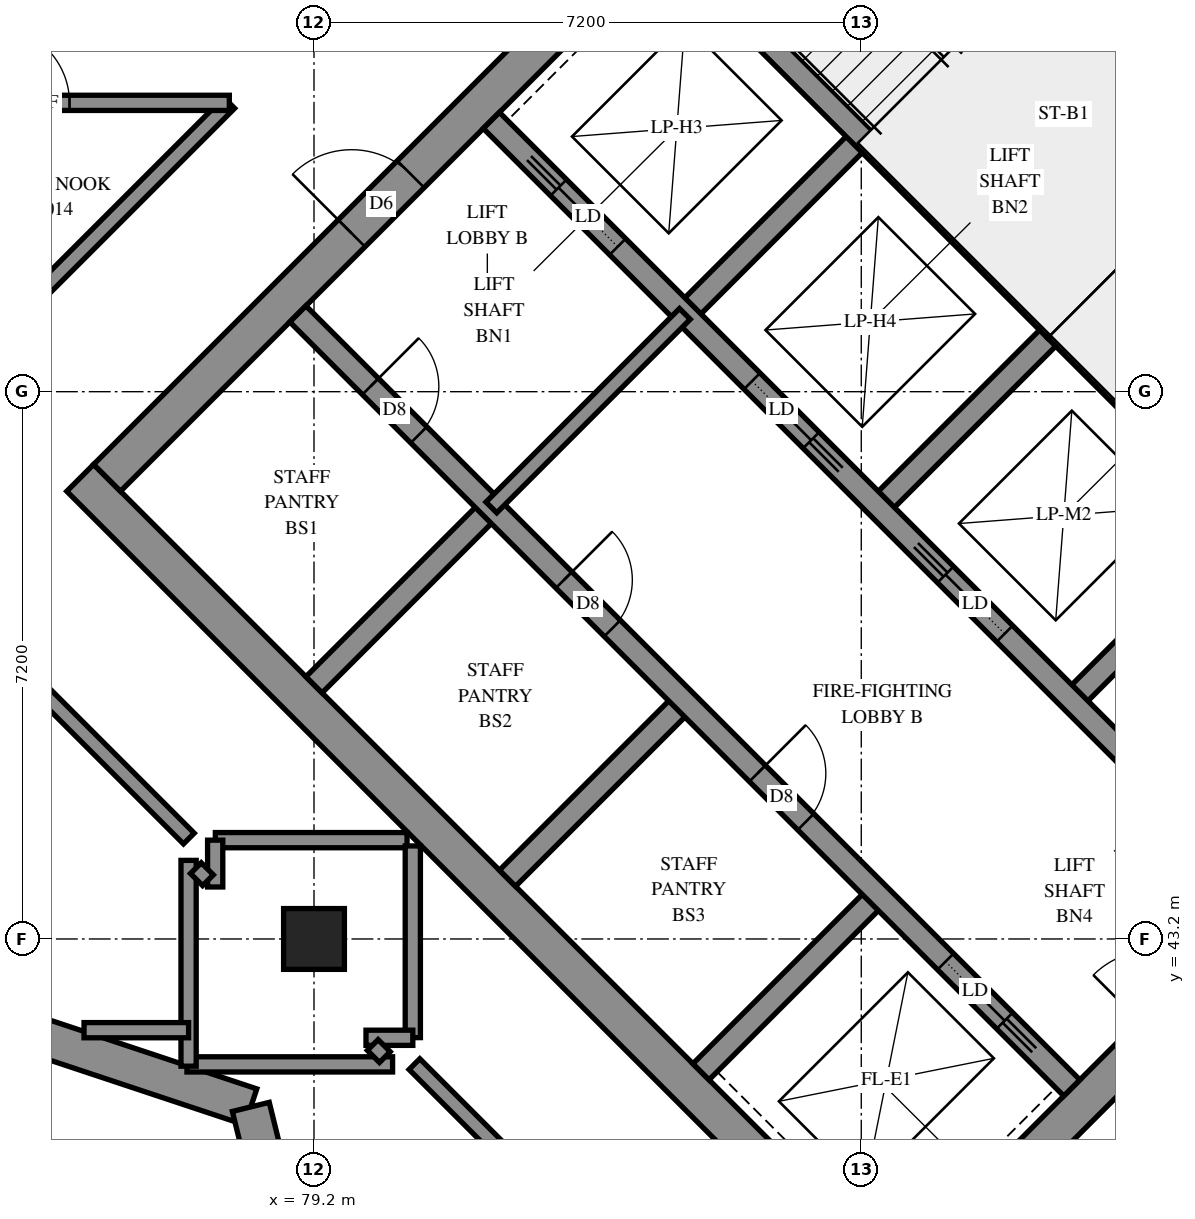
"""IFC4 building model, lengths in metres.
Left out: names, types, materials, properties, quantities, classifications, styles, units other than length and angle.
Written with IfcOpenShell. Run it as: python <this file> out.ifc"""

import sys

from ifc_helpers import new_model, si_unit, direction, frame, frame_2d, origin, origin_2d, place, context, subcontext, project, spatial, polyline, rectangle, outline, extrude, element, fill, save


model = new_model("IFC4")
c1 = context("Model", 3, precision=1e-05, world=origin(), true_north=direction((0.0, 1.0)))
c2 = subcontext(c1, "Body", "Model", "MODEL_VIEW")
j1 = project(units=[si_unit("LENGTHUNIT", "METRE"), si_unit("PLANEANGLEUNIT", "RADIAN")], contexts=[c1])
p1 = place(None, origin())
s1 = spatial("IfcSite", under=j1, at=p1, CompositionType="ELEMENT")
p2 = place(p1, origin())
s2 = spatial("IfcBuilding", under=s1, at=p2, CompositionType="ELEMENT")
p3 = place(p2, frame((0.0, 0.0, 223.6)))
s3 = spatial("IfcBuildingStorey", under=s2, at=p3, CompositionType="ELEMENT", Elevation=223.6)
p4 = place(p3, frame((79.2, 43.2, 0.0), z_axis=(0.0, 0.0, 1.0), x_axis=(1.0, 0.0, 0.0)))
e1 = element("IfcColumn", 1, at=p4, inside=s3, PredefinedType="COLUMN", context=c2, shape_type="SweptSolid", body=[
    extrude(rectangle(XDim=0.8, YDim=0.8, at=origin_2d()), origin(), (0.0, 0.0, 1.0), 3.1),
])
p5 = place(p3, frame((76.124, 49.267, -0.3), z_axis=(0.0, 0.0, 1.0), x_axis=(0.7071067812, -0.7071067812, 0.0)))
e2 = element("IfcWall", 2, at=p5, inside=s3, PredefinedType="SHEAR", context=c2, shape_type="SweptSolid", body=[
    extrude(rectangle(XDim=15.4, YDim=0.5, at=frame_2d((7.7, 0.0))), origin(), (0.0, 0.0, 1.0), 2.7),
])
p6 = place(p3, frame((86.66, 59.802, -0.3), z_axis=(0.0, 0.0, 1.0), x_axis=(0.7071067812, -0.7071067812, 0.0)))
e3 = element("IfcWall", 3, at=p6, inside=s3, PredefinedType="SHEAR", context=c2, shape_type="SweptSolid", body=[
    extrude(rectangle(XDim=15.4, YDim=0.5, at=frame_2d((7.7, 0.0))), origin(), (0.0, 0.0, 1.0), 2.7),
])
p7 = place(p6, frame((10.5, 0.0, 0.3)))
e4 = element("IfcOpeningElement", 4, at=p7, cuts=e3, PredefinedType="OPENING", context=c2, shape_type="SweptSolid", body=[
    extrude(rectangle(XDim=0.8, YDim=2.1, at=frame_2d((0.4, 1.05))), frame((0.0, 0.26, 0.0), z_axis=(0.0, -1.0, 0.0), x_axis=(1.0, 0.0, 0.0)), (0.0, 0.0, 1.0), 0.52),
])
p8 = place(p3, frame((76.478, 49.267, -0.3), z_axis=(0.0, 0.0, 1.0), x_axis=(0.7071067812, 0.7071067812, 0.0)))
e5 = element("IfcWall", 5, at=p8, inside=s3, PredefinedType="SHEAR", context=c2, shape_type="SweptSolid", body=[
    extrude(rectangle(XDim=14.4, YDim=0.5, at=frame_2d((7.2, 0.0))), origin(), (0.0, 0.0, 1.0), 2.7),
])
p9 = place(p8, frame((4.55, 0.0, 0.3)))
e6 = element("IfcOpeningElement", 6, at=p9, cuts=e5, PredefinedType="OPENING", context=c2, shape_type="SweptSolid", body=[
    extrude(rectangle(XDim=1.1, YDim=2.1, at=frame_2d((0.55, 1.05))), frame((0.0, 0.26, 0.0), z_axis=(0.0, -1.0, 0.0), x_axis=(1.0, 0.0, 0.0)), (0.0, 0.0, 1.0), 0.52),
])
p10 = place(p8, frame((11.35, 0.0, 0.3)))
e7 = element("IfcOpeningElement", 7, at=p10, cuts=e5, PredefinedType="OPENING", context=c2, shape_type="SweptSolid", body=[
    extrude(rectangle(XDim=1.1, YDim=2.1, at=frame_2d((0.55, 1.05))), frame((0.0, 0.26, 0.0), z_axis=(0.0, -1.0, 0.0), x_axis=(1.0, 0.0, 0.0)), (0.0, 0.0, 1.0), 0.52),
])
p11 = place(p3, frame((87.013, 38.731, -0.3), z_axis=(0.0, 0.0, 1.0), x_axis=(0.7071067812, 0.7071067812, 0.0)))
e8 = element("IfcWall", 8, at=p11, inside=s3, PredefinedType="SHEAR", context=c2, shape_type="SweptSolid", body=[
    extrude(rectangle(XDim=14.4, YDim=0.5, at=frame_2d((7.2, 0.0))), origin(), (0.0, 0.0, 1.0), 2.7),
])
p12 = place(p11, frame((4.55, 0.0, 0.3)))
e9 = element("IfcOpeningElement", 9, at=p12, cuts=e8, PredefinedType="OPENING", context=c2, shape_type="SweptSolid", body=[
    extrude(rectangle(XDim=1.1, YDim=2.1, at=frame_2d((0.55, 1.05))), frame((0.0, 0.26, 0.0), z_axis=(0.0, -1.0, 0.0), x_axis=(1.0, 0.0, 0.0)), (0.0, 0.0, 1.0), 0.52),
])
p13 = place(p11, frame((11.35, 0.0, 0.3)))
e10 = element("IfcOpeningElement", 10, at=p13, cuts=e8, PredefinedType="OPENING", context=c2, shape_type="SweptSolid", body=[
    extrude(rectangle(XDim=1.1, YDim=2.1, at=frame_2d((0.55, 1.05))), frame((0.0, 0.26, 0.0), z_axis=(0.0, -1.0, 0.0), x_axis=(1.0, 0.0, 0.0)), (0.0, 0.0, 1.0), 0.52),
])
for number, where, z_axis, x_axis in (
    (11, (79.2, 46.544, 0.0), (0.0, 0.0, 1.0), (0.707, 0.707, 0.0)),
    (12, (84.079, 51.423, 0.0), (0.0, 0.0, 1.0), (0.707, 0.707, 0.0)),
):
    element("IfcWall", number, at=place(p3, frame(where, z_axis=z_axis, x_axis=x_axis)), inside=s3, PredefinedType="SOLIDWALL", context=c2, shape_type="SweptSolid", body=[
        extrude(rectangle(XDim=3.3, YDim=0.3, at=frame_2d((1.65, 0.0))), origin(), (0.0, 0.0, 1.0), 3.1),
    ])
p14 = place(p3, frame((81.746, 43.999, 0.0), z_axis=(0.0, 0.0, 1.0), x_axis=(0.7071067812, 0.7071067812, 0.0)))
e13 = element("IfcWall", 13, at=p14, inside=s3, PredefinedType="SOLIDWALL", context=c2, shape_type="SweptSolid", body=[
    extrude(rectangle(XDim=3.3, YDim=0.3, at=frame_2d((1.65, 0.0))), origin(), (0.0, 0.0, 1.0), 3.1),
])
p15 = place(p3, frame((86.625, 48.878, 0.0), z_axis=(0.0, 0.0, 1.0), x_axis=(0.7071067812, 0.7071067812, 0.0)))
e14 = element("IfcWall", 14, at=p15, inside=s3, PredefinedType="SOLIDWALL", context=c2, shape_type="SweptSolid", body=[
    extrude(rectangle(XDim=3.3, YDim=0.3, at=frame_2d((1.65, 0.0))), origin(), (0.0, 0.0, 1.0), 3.1),
])
p16 = place(p3, frame((84.291, 41.453, 0.0), z_axis=(0.0, 0.0, 1.0), x_axis=(0.7071067812, 0.7071067812, 0.0)))
e15 = element("IfcWall", 15, at=p16, inside=s3, PredefinedType="SOLIDWALL", context=c2, shape_type="SweptSolid", body=[
    extrude(rectangle(XDim=3.3, YDim=0.3, at=frame_2d((1.65, 0.0))), origin(), (0.0, 0.0, 1.0), 3.1),
])
p17 = place(p3, frame((89.17, 46.332, 0.0), z_axis=(0.0, 0.0, 1.0), x_axis=(0.7071067812, 0.7071067812, 0.0)))
e16 = element("IfcWall", 16, at=p17, inside=s3, PredefinedType="SOLIDWALL", context=c2, shape_type="SweptSolid", body=[
    extrude(rectangle(XDim=3.3, YDim=0.3, at=frame_2d((1.65, 0.0))), origin(), (0.0, 0.0, 1.0), 3.1),
])
p18 = place(p3, frame((78.988, 51.423, 0.0), z_axis=(0.0, 0.0, 1.0), x_axis=(0.7071067812, -0.7071067812, 0.0)))
e17 = element("IfcWall", 17, at=p18, inside=s3, PredefinedType="SOLIDWALL", context=c2, shape_type="SweptSolid", body=[
    extrude(rectangle(XDim=14.4, YDim=0.3, at=frame_2d((7.2, 0.0))), origin(), (0.0, 0.0, 1.0), 3.1),
])
p19 = place(p18, frame((1.35, 0.0, 0.0)))
e18 = element("IfcOpeningElement", 18, at=p19, cuts=e17, PredefinedType="OPENING", context=c2, shape_type="SweptSolid", body=[
    extrude(rectangle(XDim=0.9, YDim=2.1, at=frame_2d((0.45, 1.05))), frame((0.0, 0.16, 0.0), z_axis=(0.0, -1.0, 0.0), x_axis=(1.0, 0.0, 0.0)), (0.0, 0.0, 1.0), 0.32),
])
p20 = place(p18, frame((4.95, 0.0, 0.0)))
e19 = element("IfcOpeningElement", 19, at=p20, cuts=e17, PredefinedType="OPENING", context=c2, shape_type="SweptSolid", body=[
    extrude(rectangle(XDim=0.9, YDim=2.1, at=frame_2d((0.45, 1.05))), frame((0.0, 0.16, 0.0), z_axis=(0.0, -1.0, 0.0), x_axis=(1.0, 0.0, 0.0)), (0.0, 0.0, 1.0), 0.32),
])
p21 = place(p18, frame((8.55, 0.0, 0.0)))
e20 = element("IfcOpeningElement", 20, at=p21, cuts=e17, PredefinedType="OPENING", context=c2, shape_type="SweptSolid", body=[
    extrude(rectangle(XDim=0.9, YDim=2.1, at=frame_2d((0.45, 1.05))), frame((0.0, 0.16, 0.0), z_axis=(0.0, -1.0, 0.0), x_axis=(1.0, 0.0, 0.0)), (0.0, 0.0, 1.0), 0.32),
])
p22 = place(p18, frame((12.05, 0.0, 0.0)))
e21 = element("IfcOpeningElement", 21, at=p22, cuts=e17, PredefinedType="OPENING", context=c2, shape_type="SweptSolid", body=[
    extrude(rectangle(XDim=1.1, YDim=2.1, at=frame_2d((0.55, 1.05))), frame((0.0, 0.16, 0.0), z_axis=(0.0, -1.0, 0.0), x_axis=(1.0, 0.0, 0.0)), (0.0, 0.0, 1.0), 0.32),
])
p23 = place(p3, frame((81.534, 53.969, 0.0), z_axis=(0.0, 0.0, 1.0), x_axis=(0.707103309, -0.7071102534, 0.0)))
e22 = element("IfcWall", 22, at=p23, inside=s3, PredefinedType="SOLIDWALL", context=c2, shape_type="SweptSolid", body=[
    extrude(rectangle(XDim=14.4, YDim=0.3, at=frame_2d((7.2, 0.0))), origin(), (0.0, 0.0, 1.0), 3.1),
])
p24 = place(p23, frame((1.25, 0.0, 0.0)))
e23 = element("IfcOpeningElement", 23, at=p24, cuts=e22, PredefinedType="OPENING", context=c2, shape_type="SweptSolid", body=[
    extrude(rectangle(XDim=1.1, YDim=2.1, at=frame_2d((0.55, 1.05))), frame((0.0, 0.16, 0.0), z_axis=(0.0, -1.0, 0.0), x_axis=(1.0, 0.0, 0.0)), (0.0, 0.0, 1.0), 0.32),
])
p25 = place(p23, frame((4.85, 0.0, 0.0)))
e24 = element("IfcOpeningElement", 24, at=p25, cuts=e22, PredefinedType="OPENING", context=c2, shape_type="SweptSolid", body=[
    extrude(rectangle(XDim=1.1, YDim=2.1, at=frame_2d((0.55, 1.05))), frame((0.0, 0.16, 0.0), z_axis=(0.0, -1.0, 0.0), x_axis=(1.0, 0.0, 0.0)), (0.0, 0.0, 1.0), 0.32),
])
p26 = place(p23, frame((8.45, 0.0, 0.0)))
e25 = element("IfcOpeningElement", 25, at=p26, cuts=e22, PredefinedType="OPENING", context=c2, shape_type="SweptSolid", body=[
    extrude(rectangle(XDim=1.1, YDim=2.1, at=frame_2d((0.55, 1.05))), frame((0.0, 0.16, 0.0), z_axis=(0.0, -1.0, 0.0), x_axis=(1.0, 0.0, 0.0)), (0.0, 0.0, 1.0), 0.32),
])
p27 = place(p23, frame((12.05, 0.0, 0.0)))
e26 = element("IfcOpeningElement", 26, at=p27, cuts=e22, PredefinedType="OPENING", context=c2, shape_type="SweptSolid", body=[
    extrude(rectangle(XDim=1.1, YDim=2.1, at=frame_2d((0.55, 1.05))), frame((0.0, 0.16, 0.0), z_axis=(0.0, -1.0, 0.0), x_axis=(1.0, 0.0, 0.0)), (0.0, 0.0, 1.0), 0.32),
])
for number, where, z_axis, x_axis in (
    (27, (83.867, 56.302, 0.0), (0.0, 0.0, 1.0), (0.707, -0.707, 0.0)),
    (28, (88.958, 51.211, 0.0), (0.0, 0.0, 1.0), (0.707, -0.707, 0.0)),
):
    element("IfcWall", number, at=place(p3, frame(where, z_axis=z_axis, x_axis=x_axis)), inside=s3, PredefinedType="SOLIDWALL", context=c2, shape_type="SweptSolid", body=[
        extrude(rectangle(XDim=7.2, YDim=0.3, at=frame_2d((3.6, 0.0))), origin(), (0.0, 0.0, 1.0), 3.1),
    ])
p28 = place(p3, frame((88.958, 51.211, 0.0), z_axis=(0.0, 0.0, 1.0), x_axis=(0.7071067812, 0.7071067812, 0.0)))
e29 = element("IfcWall", 29, at=p28, inside=s3, PredefinedType="SOLIDWALL", context=c2, shape_type="SweptSolid", body=[
    extrude(rectangle(XDim=4.2, YDim=0.3, at=frame_2d((2.1, 0.0))), origin(), (0.0, 0.0, 1.0), 3.1),
])
p29 = place(p3, frame((74.559, 42.257, 0.0), z_axis=(0.0, 0.0, 1.0), x_axis=(0.9489644032, -0.3153831979, 0.0)))
e30 = element("IfcWall", 30, at=p29, inside=s3, PredefinedType="SOLIDWALL", context=c2, shape_type="SweptSolid", body=[
    extrude(outline(polyline([(0.062, -0.25), (3.877, -0.25), (4.152, 0.25), (-0.062, 0.25), (0.062, -0.25)])), origin(), (0.0, 0.0, 1.0), 3.1),
])
p30 = place(p3, frame((78.369, 40.991, 0.0), z_axis=(0.0, 0.0, 1.0), x_axis=(0.2390889045, -0.9709976806, 0.0)))
e31 = element("IfcWall", 31, at=p30, inside=s3, PredefinedType="SOLIDWALL", context=c2, shape_type="SweptSolid", body=[
    extrude(outline(polyline([(0.138, -0.25), (4.775, -0.25), (4.486, 0.25), (-0.138, 0.25), (0.138, -0.25)])), origin(), (0.0, 0.0, 1.0), 3.1),
])
p31 = place(p30, frame((2.259, 0.0, 0.45)))
e32 = element("IfcOpeningElement", 32, at=p31, cuts=e31, PredefinedType="OPENING", context=c2, shape_type="SweptSolid", body=[
    extrude(rectangle(XDim=1.2, YDim=2.5, at=frame_2d((0.6, 1.25))), frame((0.0, 0.26, 0.0), z_axis=(0.0, -1.0, 0.0), x_axis=(1.0, 0.0, 0.0)), (0.0, 0.0, 1.0), 0.52),
])
p32 = place(p3, frame((81.534, 48.878, 0.0), z_axis=(0.0, 0.0, 1.0), x_axis=(0.707092892, 0.7071206701, 0.0)))
e33 = element("IfcWall", 33, at=p32, inside=s3, PredefinedType="PARTITIONING", context=c2, shape_type="SweptSolid", body=[
    extrude(rectangle(XDim=3.6, YDim=0.2, at=frame_2d((1.8, 0.0))), origin(), (0.0, 0.0, 1.0), 3.1),
])
p33 = place(p3, frame((86.835, 35.231, 0.0), z_axis=(0.0, 0.0, 1.0), x_axis=(0.7071067812, 0.7071067812, 0.0)))
e34 = element("IfcWall", 34, at=p33, inside=s3, PredefinedType="PARTITIONING", context=c2, shape_type="SweptSolid", body=[
    extrude(rectangle(XDim=7.6, YDim=0.2, at=frame_2d((3.8, 0.0))), origin(), (0.0, 0.0, 1.0), 3.1),
])
p34 = place(p33, frame((6.346, 0.0, 0.0)))
e35 = element("IfcOpeningElement", 35, at=p34, cuts=e34, PredefinedType="OPENING", context=c2, shape_type="SweptSolid", body=[
    extrude(rectangle(XDim=1.0, YDim=2.1, at=frame_2d((0.5, 1.05))), frame((0.0, 0.11, 0.0), z_axis=(0.0, -1.0, 0.0), x_axis=(1.0, 0.0, 0.0)), (0.0, 0.0, 1.0), 0.22),
])
p35 = place(p3, frame((80.522, 41.553, 0.0), z_axis=(0.0, 0.0, 1.0), x_axis=(0.7071067812, -0.7071067812, 0.0)))
e36 = element("IfcWall", 36, at=p35, inside=s3, PredefinedType="PARTITIONING", context=c2, shape_type="SweptSolid", body=[
    extrude(rectangle(XDim=6.836, YDim=0.2, at=frame_2d((3.418, 0.0))), origin(), (0.0, 0.0, 1.0), 3.1),
])
p36 = place(p3, frame((74.601, 50.715, 0.0), z_axis=(0.0, 0.0, 1.0), x_axis=(0.7071067812, 0.7071067812, 0.0)))
e37 = element("IfcWall", 37, at=p36, inside=s3, PredefinedType="PARTITIONING", context=c2, shape_type="SweptSolid", body=[
    extrude(rectangle(XDim=4.927, YDim=0.2, at=frame_2d((2.464, 0.0))), origin(), (0.0, 0.0, 1.0), 3.1),
])
p37 = place(p3, frame((74.272, 47.803, 0.0), z_axis=(0.0, 0.0, 1.0), x_axis=(0.7071067812, -0.7071067812, 0.0)))
e38 = element("IfcWall", 38, at=p37, inside=s3, PredefinedType="PARTITIONING", context=c2, shape_type="SweptSolid", body=[
    extrude(rectangle(XDim=4.641, YDim=0.2, at=frame_2d((2.321, 0.0))), origin(), (0.0, 0.0, 1.0), 3.1),
])
p38 = place(p37, frame((0.382, 0.0, 0.0)))
e39 = element("IfcOpeningElement", 39, at=p38, cuts=e38, PredefinedType="OPENING", context=c2, shape_type="SweptSolid", body=[
    extrude(rectangle(XDim=1.0, YDim=2.1, at=frame_2d((0.5, 1.05))), frame((0.0, 0.11, 0.0), z_axis=(0.0, -1.0, 0.0), x_axis=(1.0, 0.0, 0.0)), (0.0, 0.0, 1.0), 0.22),
])
p39 = place(p3, frame((74.602, 54.2, 0.0), z_axis=(0.0, 0.0, 1.0), x_axis=(1.0, 0.0, 0.0)))
e40 = element("IfcWall", 40, at=p39, inside=s3, PredefinedType="PARTITIONING", context=c2, shape_type="SweptSolid", body=[
    extrude(rectangle(XDim=3.484, YDim=0.2, at=frame_2d((1.742, 0.0))), origin(), (0.0, 0.0, 1.0), 3.1),
])
p40 = place(p39, frame((0.382, 0.0, 0.0)))
e41 = element("IfcOpeningElement", 41, at=p40, cuts=e40, PredefinedType="OPENING", context=c2, shape_type="SweptSolid", body=[
    extrude(rectangle(XDim=1.0, YDim=2.1, at=frame_2d((0.5, 1.05))), frame((0.0, 0.11, 0.0), z_axis=(0.0, -1.0, 0.0), x_axis=(1.0, 0.0, 0.0)), (0.0, 0.0, 1.0), 0.22),
])
p41 = place(p3, frame((77.528, 41.55, 0.0), z_axis=(0.0, 0.0, 1.0), x_axis=(1.0, 0.0, 0.0)))
e42 = element("IfcWall", 42, at=p41, inside=s3, PredefinedType="PARTITIONING", context=c2, shape_type="SweptSolid", body=[
    extrude(rectangle(XDim=2.705, YDim=0.2, at=frame_2d((1.353, 0.0))), origin(), (0.0, 0.0, 1.0), 3.1),
])
p42 = place(p3, frame((77.55, 41.526, 0.0), z_axis=(0.0, 0.0, 1.0), x_axis=(0.0, 1.0, 0.0)))
e43 = element("IfcWall", 43, at=p42, inside=s3, PredefinedType="PARTITIONING", context=c2, shape_type="SweptSolid", body=[
    extrude(rectangle(XDim=2.708, YDim=0.2, at=frame_2d((1.354, 0.0))), origin(), (0.0, 0.0, 1.0), 3.1),
])
for number, where, z_axis, x_axis in (
    (44, (77.902, 44.5, 0.0), (0.0, 0.0, 1.0), (1.0, 0.0, 0.0)),
    (45, (80.5, 41.902, 0.0), (0.0, 0.0, 1.0), (0.0, 1.0, 0.0)),
):
    element("IfcWall", number, at=place(p3, frame(where, z_axis=z_axis, x_axis=x_axis)), inside=s3, PredefinedType="PARTITIONING", context=c2, shape_type="SweptSolid", body=[
        extrude(rectangle(XDim=2.522, YDim=0.2, at=frame_2d((1.261, 0.0))), origin(), (0.0, 0.0, 1.0), 3.1),
    ])
p43 = place(p3, frame((76.174, 42.0, 0.0), z_axis=(0.0, 0.0, 1.0), x_axis=(1.0, 0.0, 0.0)))
e46 = element("IfcWall", 46, at=p43, inside=s3, PredefinedType="PARTITIONING", context=c2, shape_type="SweptSolid", body=[
    extrude(rectangle(XDim=1.375, YDim=0.2, at=frame_2d((0.688, 0.0))), origin(), (0.0, 0.0, 1.0), 3.1),
])
for number, where, z_axis, x_axis in (
    (47, (77.9, 43.884, 0.0), (0.0, 0.0, 1.0), (0.0, 1.0, 0.0)),
    (48, (79.884, 41.9, 0.0), (0.0, 0.0, 1.0), (1.0, 0.0, 0.0)),
):
    element("IfcWall", number, at=place(p3, frame(where, z_axis=z_axis, x_axis=x_axis)), inside=s3, PredefinedType="PARTITIONING", context=c2, shape_type="SweptSolid", body=[
        extrude(rectangle(XDim=0.616, YDim=0.2, at=frame_2d((0.308, 0.0))), origin(), (0.0, 0.0, 1.0), 3.1),
    ])
for number, where, z_axis, x_axis in (
    (49, (79.973, 41.805, 0.0), (0.0, 0.0, 1.0), (0.707, -0.707, 0.0)),
    (50, (77.646, 44.132, 0.0), (0.0, 0.0, 1.0), (0.707, -0.707, 0.0)),
):
    element("IfcWall", number, at=place(p3, frame(where, z_axis=z_axis, x_axis=x_axis)), inside=s3, PredefinedType="PARTITIONING", context=c2, shape_type="SweptSolid", body=[
        extrude(rectangle(XDim=0.225, YDim=0.2, at=frame_2d((0.112, 0.0))), origin(), (0.0, 0.0, 1.0), 3.1),
    ])
p44 = place(p9, origin())
e51 = element("IfcDoor", 51, at=p44, inside=s3, OperationType="DOUBLE_DOOR_SINGLE_SWING", PredefinedType="DOOR", context=c2, shape_type="SweptSolid", body=[
    extrude(rectangle(XDim=1.1, YDim=2.1, at=frame_2d((0.55, 1.05))), frame((0.0, 0.025, 0.0), z_axis=(0.0, -1.0, 0.0), x_axis=(1.0, 0.0, 0.0)), (0.0, 0.0, 1.0), 0.05),
])
fill(e6, e51)
p45 = place(p19, origin())
e52 = element("IfcDoor", 52, at=p45, inside=s3, OperationType="SINGLE_SWING_LEFT", PredefinedType="DOOR", context=c2, shape_type="SweptSolid", body=[
    extrude(rectangle(XDim=0.9, YDim=2.1, at=frame_2d((0.45, 1.05))), frame((0.0, 0.025, 0.0), z_axis=(0.0, -1.0, 0.0), x_axis=(1.0, 0.0, 0.0)), (0.0, 0.0, 1.0), 0.05),
])
fill(e18, e52)
p46 = place(p20, origin())
e53 = element("IfcDoor", 53, at=p46, inside=s3, OperationType="SINGLE_SWING_LEFT", PredefinedType="DOOR", context=c2, shape_type="SweptSolid", body=[
    extrude(rectangle(XDim=0.9, YDim=2.1, at=frame_2d((0.45, 1.05))), frame((0.0, 0.025, 0.0), z_axis=(0.0, -1.0, 0.0), x_axis=(1.0, 0.0, 0.0)), (0.0, 0.0, 1.0), 0.05),
])
fill(e19, e53)
p47 = place(p21, origin())
e54 = element("IfcDoor", 54, at=p47, inside=s3, OperationType="SINGLE_SWING_LEFT", PredefinedType="DOOR", context=c2, shape_type="SweptSolid", body=[
    extrude(rectangle(XDim=0.9, YDim=2.1, at=frame_2d((0.45, 1.05))), frame((0.0, 0.025, 0.0), z_axis=(0.0, -1.0, 0.0), x_axis=(1.0, 0.0, 0.0)), (0.0, 0.0, 1.0), 0.05),
])
fill(e20, e54)
p48 = place(p22, origin())
e55 = element("IfcDoor", 55, at=p48, inside=s3, OperationType="SLIDING_TO_RIGHT", PredefinedType="DOOR", context=c2, shape_type="SweptSolid", body=[
    extrude(rectangle(XDim=1.1, YDim=2.1, at=frame_2d((0.55, 1.05))), frame((0.0, 0.025, 0.0), z_axis=(0.0, -1.0, 0.0), x_axis=(1.0, 0.0, 0.0)), (0.0, 0.0, 1.0), 0.05),
])
fill(e21, e55)
p49 = place(p24, origin())
e56 = element("IfcDoor", 56, at=p49, inside=s3, OperationType="SLIDING_TO_LEFT", PredefinedType="DOOR", context=c2, shape_type="SweptSolid", body=[
    extrude(rectangle(XDim=1.1, YDim=2.1, at=frame_2d((0.55, 1.05))), frame((0.0, 0.025, 0.0), z_axis=(0.0, -1.0, 0.0), x_axis=(1.0, 0.0, 0.0)), (0.0, 0.0, 1.0), 0.05),
])
fill(e23, e56)
p50 = place(p25, origin())
e57 = element("IfcDoor", 57, at=p50, inside=s3, OperationType="SLIDING_TO_RIGHT", PredefinedType="DOOR", context=c2, shape_type="SweptSolid", body=[
    extrude(rectangle(XDim=1.1, YDim=2.1, at=frame_2d((0.55, 1.05))), frame((0.0, 0.025, 0.0), z_axis=(0.0, -1.0, 0.0), x_axis=(1.0, 0.0, 0.0)), (0.0, 0.0, 1.0), 0.05),
])
fill(e24, e57)
p51 = place(p26, origin())
e58 = element("IfcDoor", 58, at=p51, inside=s3, OperationType="SLIDING_TO_LEFT", PredefinedType="DOOR", context=c2, shape_type="SweptSolid", body=[
    extrude(rectangle(XDim=1.1, YDim=2.1, at=frame_2d((0.55, 1.05))), frame((0.0, 0.025, 0.0), z_axis=(0.0, -1.0, 0.0), x_axis=(1.0, 0.0, 0.0)), (0.0, 0.0, 1.0), 0.05),
])
fill(e25, e58)
p52 = place(p40, origin())
e59 = element("IfcDoor", 59, at=p52, inside=s3, OperationType="SINGLE_SWING_RIGHT", PredefinedType="DOOR", context=c2, shape_type="SweptSolid", body=[
    extrude(rectangle(XDim=1.0, YDim=2.1, at=frame_2d((0.5, 1.05))), frame((0.0, 0.025, 0.0), z_axis=(0.0, -1.0, 0.0), x_axis=(1.0, 0.0, 0.0)), (0.0, 0.0, 1.0), 0.05),
])
fill(e41, e59)
save(model, sys.argv[1])
